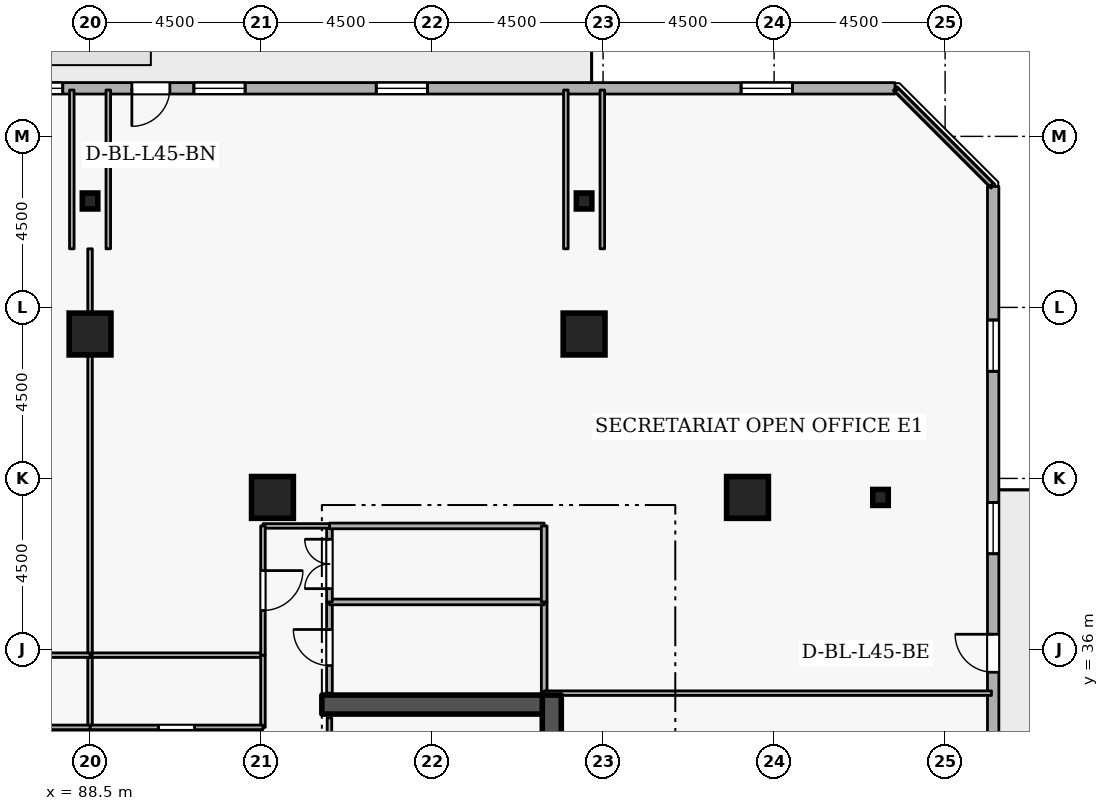
"""IFC4 building model, lengths in metres.
Left out: names, types, materials, properties, quantities, classifications, styles, units other than length and angle.
Written with IfcOpenShell. Run it as: python <this file> out.ifc"""

import sys

from ifc_helpers import new_model, si_unit, direction, frame, frame_2d, origin, origin_2d, place, context, subcontext, project, spatial, rectangle, i_section, extrude, element, fill, save


model = new_model("IFC4")
c1 = context("Model", 3, precision=1e-05, world=origin(), true_north=direction((0.0, 1.0)))
c2 = subcontext(c1, "Body", "Model", "MODEL_VIEW")
j1 = project(units=[si_unit("LENGTHUNIT", "METRE"), si_unit("PLANEANGLEUNIT", "RADIAN")], contexts=[c1])
p1 = place(None, origin())
s1 = spatial("IfcSite", under=j1, at=p1, CompositionType="ELEMENT")
p2 = place(p1, origin())
s2 = spatial("IfcBuilding", under=s1, at=p2, CompositionType="ELEMENT")
p3 = place(p2, frame((0.0, 0.0, 170.7)))
s3 = spatial("IfcBuildingStorey", under=s2, at=p3, CompositionType="ELEMENT", Elevation=170.7)
p4 = place(p3, frame((100.65, 19.2, 0.0), z_axis=(0.0, 0.0, 1.0), x_axis=(0.0, 1.0, 0.0)))
e1 = element("IfcWall", 1, at=p4, inside=s3, PredefinedType="SHEAR", context=c2, shape_type="SweptSolid", body=[
    extrude(rectangle(XDim=15.6, YDim=0.5, at=frame_2d((7.8, 0.0))), origin(), (0.0, 0.0, 1.0), 3.6),
])
p5 = place(p3, frame((94.6, 34.55, 0.0), z_axis=(0.0, 0.0, 1.0), x_axis=(1.0, 0.0, 0.0)))
e2 = element("IfcWall", 2, at=p5, inside=s3, PredefinedType="SHEAR", context=c2, shape_type="SweptSolid", body=[
    extrude(rectangle(XDim=5.8, YDim=0.5, at=frame_2d((2.9, 0.0))), origin(), (0.0, 0.0, 1.0), 3.6),
])
for number, where, z_axis, x_axis in (
    (3, (105.8, 40.0, 0.0), (0.0, 0.0, 1.0), (1.0, 0.0, 0.0)),
    (4, (101.5, 44.3, 0.0), (0.0, 0.0, 1.0), (1.0, 0.0, 0.0)),
    (5, (88.5, 44.3, 0.0), (0.0, 0.0, 1.0), (1.0, 0.0, 0.0)),
    (6, (93.3, 40.0, 0.0), (0.0, 0.0, 1.0), (1.0, 0.0, 0.0)),
):
    element("IfcColumn", number, at=place(p3, frame(where, z_axis=z_axis, x_axis=x_axis)), inside=s3, PredefinedType="COLUMN", context=c2, shape_type="SweptSolid", body=[
        extrude(rectangle(XDim=1.1, YDim=1.1, at=origin_2d()), origin(), (0.0, 0.0, 1.0), 3.6),
    ])
for number, where, z_axis, x_axis in (
    (7, (109.3, 40.0, 0.0), (0.0, 0.0, 1.0), (1.0, 0.0, 0.0)),
    (8, (101.5, 47.8, 0.0), (0.0, 0.0, 1.0), (1.0, 0.0, 0.0)),
    (9, (88.5, 47.8, 0.0), (0.0, 0.0, 1.0), (1.0, 0.0, 0.0)),
):
    element("IfcColumn", number, at=place(p3, frame(where, z_axis=z_axis, x_axis=x_axis)), inside=s3, PredefinedType="COLUMN", context=c2, shape_type="SweptSolid", body=[
        extrude(i_section(OverallWidth=0.407, OverallDepth=0.419, WebThickness=0.031, FlangeThickness=0.049, FilletRadius=0.015, at=origin_2d()), origin(), (0.0, 0.0, 1.0), 3.6),
    ])
p6 = place(p3, frame((112.265, 11.819, 0.0), z_axis=(0.0, 0.0, 1.0), x_axis=(0.0, 1.0, 0.0)))
e10 = element("IfcWall", 10, at=p6, inside=s3, PredefinedType="STANDARD", context=c2, shape_type="SweptSolid", body=[
    extrude(rectangle(XDim=36.363, YDim=0.3, at=frame_2d((18.181, 0.0))), origin(), (0.0, 0.0, 1.0), 2.22),
])
p7 = place(p6, frame((23.581, 0.0, 0.0)))
e11 = element("IfcOpeningElement", 11, at=p7, cuts=e10, PredefinedType="OPENING", context=c2, shape_type="SweptSolid", body=[
    extrude(rectangle(XDim=1.0, YDim=2.08, at=frame_2d((0.5, 1.04))), frame((0.0, 0.16, 0.0), z_axis=(0.0, -1.0, 0.0), x_axis=(1.0, 0.0, 0.0)), (0.0, 0.0, 1.0), 0.32),
])
p8 = place(p6, frame((2.7, 0.0, 0.72)))
e12 = element("IfcOpeningElement", 12, at=p8, cuts=e10, PredefinedType="OPENING", context=c2, shape_type="SweptSolid", body=[
    extrude(rectangle(XDim=1.35, YDim=1.05, at=frame_2d((0.675, 0.525))), frame((0.0, 0.16, 0.0), z_axis=(0.0, -1.0, 0.0), x_axis=(1.0, 0.0, 0.0)), (0.0, 0.0, 1.0), 0.32),
])
p9 = place(p6, frame((7.5, 0.0, 0.72)))
e13 = element("IfcOpeningElement", 13, at=p9, cuts=e10, PredefinedType="OPENING", context=c2, shape_type="SweptSolid", body=[
    extrude(rectangle(XDim=1.35, YDim=1.05, at=frame_2d((0.675, 0.525))), frame((0.0, 0.16, 0.0), z_axis=(0.0, -1.0, 0.0), x_axis=(1.0, 0.0, 0.0)), (0.0, 0.0, 1.0), 0.32),
])
p10 = place(p6, frame((12.3, 0.0, 0.72)))
e14 = element("IfcOpeningElement", 14, at=p10, cuts=e10, PredefinedType="OPENING", context=c2, shape_type="SweptSolid", body=[
    extrude(rectangle(XDim=1.35, YDim=1.05, at=frame_2d((0.675, 0.525))), frame((0.0, 0.16, 0.0), z_axis=(0.0, -1.0, 0.0), x_axis=(1.0, 0.0, 0.0)), (0.0, 0.0, 1.0), 0.32),
])
p11 = place(p6, frame((17.1, 0.0, 0.72)))
e15 = element("IfcOpeningElement", 15, at=p11, cuts=e10, PredefinedType="OPENING", context=c2, shape_type="SweptSolid", body=[
    extrude(rectangle(XDim=1.35, YDim=1.05, at=frame_2d((0.675, 0.525))), frame((0.0, 0.16, 0.0), z_axis=(0.0, -1.0, 0.0), x_axis=(1.0, 0.0, 0.0)), (0.0, 0.0, 1.0), 0.32),
])
p12 = place(p6, frame((26.7, 0.0, 0.72)))
e16 = element("IfcOpeningElement", 16, at=p12, cuts=e10, PredefinedType="OPENING", context=c2, shape_type="SweptSolid", body=[
    extrude(rectangle(XDim=1.35, YDim=1.05, at=frame_2d((0.675, 0.525))), frame((0.0, 0.16, 0.0), z_axis=(0.0, -1.0, 0.0), x_axis=(1.0, 0.0, 0.0)), (0.0, 0.0, 1.0), 0.32),
])
p13 = place(p6, frame((31.5, 0.0, 0.72)))
e17 = element("IfcOpeningElement", 17, at=p13, cuts=e10, PredefinedType="OPENING", context=c2, shape_type="SweptSolid", body=[
    extrude(rectangle(XDim=1.35, YDim=1.05, at=frame_2d((0.675, 0.525))), frame((0.0, 0.16, 0.0), z_axis=(0.0, -1.0, 0.0), x_axis=(1.0, 0.0, 0.0)), (0.0, 0.0, 1.0), 0.32),
])
p14 = place(p3, frame((109.681, 50.765, 0.0), z_axis=(0.0, 0.0, 1.0), x_axis=(-1.0, 0.0, 0.0)))
e18 = element("IfcWall", 18, at=p14, inside=s3, PredefinedType="STANDARD", context=c2, shape_type="SweptSolid", body=[
    extrude(rectangle(XDim=36.363, YDim=0.3, at=frame_2d((18.181, 0.0))), origin(), (0.0, 0.0, 1.0), 2.22),
])
p15 = place(p14, frame((19.081, 0.0, 0.0)))
e19 = element("IfcOpeningElement", 19, at=p15, cuts=e18, PredefinedType="OPENING", context=c2, shape_type="SweptSolid", body=[
    extrude(rectangle(XDim=1.0, YDim=2.08, at=frame_2d((0.5, 1.04))), frame((0.0, 0.16, 0.0), z_axis=(0.0, -1.0, 0.0), x_axis=(1.0, 0.0, 0.0)), (0.0, 0.0, 1.0), 0.32),
])
p16 = place(p14, frame((2.7, 0.0, 0.72)))
e20 = element("IfcOpeningElement", 20, at=p16, cuts=e18, PredefinedType="OPENING", context=c2, shape_type="SweptSolid", body=[
    extrude(rectangle(XDim=1.35, YDim=1.05, at=frame_2d((0.675, 0.525))), frame((0.0, 0.16, 0.0), z_axis=(0.0, -1.0, 0.0), x_axis=(1.0, 0.0, 0.0)), (0.0, 0.0, 1.0), 0.32),
])
p17 = place(p14, frame((12.3, 0.0, 0.72)))
e21 = element("IfcOpeningElement", 21, at=p17, cuts=e18, PredefinedType="OPENING", context=c2, shape_type="SweptSolid", body=[
    extrude(rectangle(XDim=1.35, YDim=1.05, at=frame_2d((0.675, 0.525))), frame((0.0, 0.16, 0.0), z_axis=(0.0, -1.0, 0.0), x_axis=(1.0, 0.0, 0.0)), (0.0, 0.0, 1.0), 0.32),
])
p18 = place(p14, frame((17.1, 0.0, 0.72)))
e22 = element("IfcOpeningElement", 22, at=p18, cuts=e18, PredefinedType="OPENING", context=c2, shape_type="SweptSolid", body=[
    extrude(rectangle(XDim=1.35, YDim=1.05, at=frame_2d((0.675, 0.525))), frame((0.0, 0.16, 0.0), z_axis=(0.0, -1.0, 0.0), x_axis=(1.0, 0.0, 0.0)), (0.0, 0.0, 1.0), 0.32),
])
p19 = place(p14, frame((21.9, 0.0, 0.72)))
e23 = element("IfcOpeningElement", 23, at=p19, cuts=e18, PredefinedType="OPENING", context=c2, shape_type="SweptSolid", body=[
    extrude(rectangle(XDim=1.35, YDim=1.05, at=frame_2d((0.675, 0.525))), frame((0.0, 0.16, 0.0), z_axis=(0.0, -1.0, 0.0), x_axis=(1.0, 0.0, 0.0)), (0.0, 0.0, 1.0), 0.32),
])
p20 = place(p14, frame((26.7, 0.0, 0.72)))
e24 = element("IfcOpeningElement", 24, at=p20, cuts=e18, PredefinedType="OPENING", context=c2, shape_type="SweptSolid", body=[
    extrude(rectangle(XDim=1.35, YDim=1.05, at=frame_2d((0.675, 0.525))), frame((0.0, 0.16, 0.0), z_axis=(0.0, -1.0, 0.0), x_axis=(1.0, 0.0, 0.0)), (0.0, 0.0, 1.0), 0.32),
])
p21 = place(p14, frame((31.5, 0.0, 0.72)))
e25 = element("IfcOpeningElement", 25, at=p21, cuts=e18, PredefinedType="OPENING", context=c2, shape_type="SweptSolid", body=[
    extrude(rectangle(XDim=1.35, YDim=1.05, at=frame_2d((0.675, 0.525))), frame((0.0, 0.16, 0.0), z_axis=(0.0, -1.0, 0.0), x_axis=(1.0, 0.0, 0.0)), (0.0, 0.0, 1.0), 0.32),
])
p22 = place(p3, frame((94.8, 32.1, 0.0), z_axis=(0.0, 0.0, 1.0), x_axis=(0.0, 1.0, 0.0)))
e26 = element("IfcWall", 26, at=p22, inside=s3, PredefinedType="PARTITIONING", context=c2, shape_type="SweptSolid", body=[
    extrude(rectangle(XDim=2.1, YDim=0.12, at=frame_2d((1.05, 0.0))), origin(), (0.0, 0.0, 1.0), 3.26),
])
p23 = place(p22, frame((0.575, 0.0, 0.0)))
e27 = element("IfcOpeningElement", 27, at=p23, cuts=e26, PredefinedType="OPENING", context=c2, shape_type="SweptSolid", body=[
    extrude(rectangle(XDim=0.95, YDim=2.1, at=frame_2d((0.475, 1.05))), frame((0.0, 0.07, 0.0), z_axis=(0.0, -1.0, 0.0), x_axis=(1.0, 0.0, 0.0)), (0.0, 0.0, 1.0), 0.14),
])
p24 = place(p3, frame((100.45, 37.25, 0.0), z_axis=(0.0, 0.0, 1.0), x_axis=(0.0, -1.0, 0.0)))
e28 = element("IfcWall", 28, at=p24, inside=s3, PredefinedType="PARTITIONING", context=c2, shape_type="SweptSolid", body=[
    extrude(rectangle(XDim=2.4, YDim=0.15, at=frame_2d((1.2, 0.0))), origin(), (0.0, 0.0, 1.0), 3.26),
])
p25 = place(p3, frame((94.8, 34.85, 0.0), z_axis=(0.0, 0.0, 1.0), x_axis=(0.0, 1.0, 0.0)))
e29 = element("IfcWall", 29, at=p25, inside=s3, PredefinedType="PARTITIONING", context=c2, shape_type="SweptSolid", body=[
    extrude(rectangle(XDim=2.4, YDim=0.15, at=frame_2d((1.2, 0.0))), origin(), (0.0, 0.0, 1.0), 3.26),
])
p26 = place(p25, frame((0.725, 0.0, 0.0)))
e30 = element("IfcOpeningElement", 30, at=p26, cuts=e29, PredefinedType="OPENING", context=c2, shape_type="SweptSolid", body=[
    extrude(rectangle(XDim=0.95, YDim=2.1, at=frame_2d((0.475, 1.05))), frame((0.0, 0.085, 0.0), z_axis=(0.0, -1.0, 0.0), x_axis=(1.0, 0.0, 0.0)), (0.0, 0.0, 1.0), 0.17),
])
p27 = place(p3, frame((94.8, 37.25, 0.0), z_axis=(0.0, 0.0, 1.0), x_axis=(1.0, 0.0, 0.0)))
e31 = element("IfcWall", 31, at=p27, inside=s3, PredefinedType="PARTITIONING", context=c2, shape_type="SweptSolid", body=[
    extrude(rectangle(XDim=5.65, YDim=0.15, at=frame_2d((2.825, 0.0))), origin(), (0.0, 0.0, 1.0), 3.26),
])
p28 = place(p3, frame((94.8, 37.25, 0.0), z_axis=(0.0, 0.0, 1.0), x_axis=(0.0, 1.0, 0.0)))
e32 = element("IfcWall", 32, at=p28, inside=s3, PredefinedType="PARTITIONING", context=c2, shape_type="SweptSolid", body=[
    extrude(rectangle(XDim=2.0, YDim=0.15, at=frame_2d((1.0, 0.0))), origin(), (0.0, 0.0, 1.0), 3.26),
])
p29 = place(p28, frame((0.35, 0.0, 0.0)))
e33 = element("IfcOpeningElement", 33, at=p29, cuts=e32, PredefinedType="OPENING", context=c2, shape_type="SweptSolid", body=[
    extrude(rectangle(XDim=1.3, YDim=2.12, at=frame_2d((0.65, 1.06))), frame((0.0, 0.085, 0.0), z_axis=(0.0, -1.0, 0.0), x_axis=(1.0, 0.0, 0.0)), (0.0, 0.0, 1.0), 0.17),
])
p30 = place(p3, frame((94.8, 39.25, 0.0), z_axis=(0.0, 0.0, 1.0), x_axis=(1.0, 0.0, 0.0)))
e34 = element("IfcWall", 34, at=p30, inside=s3, PredefinedType="PARTITIONING", context=c2, shape_type="SweptSolid", body=[
    extrude(rectangle(XDim=5.65, YDim=0.15, at=frame_2d((2.825, 0.0))), origin(), (0.0, 0.0, 1.0), 3.26),
])
p31 = place(p3, frame((100.45, 39.25, 0.0), z_axis=(0.0, 0.0, 1.0), x_axis=(0.0, -1.0, 0.0)))
e35 = element("IfcWall", 35, at=p31, inside=s3, PredefinedType="PARTITIONING", context=c2, shape_type="SweptSolid", body=[
    extrude(rectangle(XDim=2.0, YDim=0.15, at=frame_2d((1.0, 0.0))), origin(), (0.0, 0.0, 1.0), 3.26),
])
p32 = place(p3, frame((88.5, 33.95, 0.0), z_axis=(0.0, 0.0, 1.0), x_axis=(0.0, 1.0, 0.0)))
e36 = element("IfcWall", 36, at=p32, inside=s3, PredefinedType="PARTITIONING", context=c2, shape_type="SweptSolid", body=[
    extrude(rectangle(XDim=1.9, YDim=0.12, at=frame_2d((0.95, 0.0))), origin(), (0.0, 0.0, 1.0), 1.785),
])
p33 = place(p3, frame((88.5, 35.85, 0.0), z_axis=(0.0, 0.0, 1.0), x_axis=(1.0, 0.0, 0.0)))
e37 = element("IfcWall", 37, at=p33, inside=s3, PredefinedType="PARTITIONING", context=c2, shape_type="SweptSolid", body=[
    extrude(rectangle(XDim=4.55, YDim=0.12, at=frame_2d((2.275, 0.0))), origin(), (0.0, 0.0, 1.0), 3.26),
])
p34 = place(p3, frame((93.05, 35.85, 0.0), z_axis=(0.0, 0.0, 1.0), x_axis=(0.0, -1.0, 0.0)))
e38 = element("IfcWall", 38, at=p34, inside=s3, PredefinedType="PARTITIONING", context=c2, shape_type="SweptSolid", body=[
    extrude(rectangle(XDim=1.9, YDim=0.12, at=frame_2d((0.95, 0.0))), origin(), (0.0, 0.0, 1.0), 3.26),
])
p35 = place(p3, frame((93.05, 33.95, 0.0), z_axis=(0.0, 0.0, 1.0), x_axis=(-1.0, 0.0, 0.0)))
e39 = element("IfcWall", 39, at=p35, inside=s3, PredefinedType="PARTITIONING", context=c2, shape_type="SweptSolid", body=[
    extrude(rectangle(XDim=4.55, YDim=0.12, at=frame_2d((2.275, 0.0))), origin(), (0.0, 0.0, 1.0), 3.26),
])
p36 = place(p35, frame((1.8, 0.0, 0.0)))
e40 = element("IfcOpeningElement", 40, at=p36, cuts=e39, PredefinedType="OPENING", context=c2, shape_type="SweptSolid", body=[
    extrude(rectangle(XDim=0.95, YDim=2.1, at=frame_2d((0.475, 1.05))), frame((0.0, 0.07, 0.0), z_axis=(0.0, -1.0, 0.0), x_axis=(1.0, 0.0, 0.0)), (0.0, 0.0, 1.0), 0.14),
])
p37 = place(p3, frame((94.8, 39.25, 0.0), z_axis=(0.0, 0.0, 1.0), x_axis=(-1.0, 0.0, 0.0)))
e41 = element("IfcWall", 41, at=p37, inside=s3, PredefinedType="PARTITIONING", context=c2, shape_type="SweptSolid", body=[
    extrude(rectangle(XDim=1.75, YDim=0.12, at=frame_2d((0.875, 0.0))), origin(), (0.0, 0.0, 1.0), 3.26),
])
p38 = place(p3, frame((93.05, 39.25, 0.0), z_axis=(0.0, 0.0, 1.0), x_axis=(0.0, -1.0, 0.0)))
e42 = element("IfcWall", 42, at=p38, inside=s3, PredefinedType="PARTITIONING", context=c2, shape_type="SweptSolid", body=[
    extrude(rectangle(XDim=3.4, YDim=0.12, at=frame_2d((1.7, 0.0))), origin(), (0.0, 0.0, 1.0), 3.26),
])
p39 = place(p38, frame((1.175, 0.0, 0.0)))
e43 = element("IfcOpeningElement", 43, at=p39, cuts=e42, PredefinedType="OPENING", context=c2, shape_type="SweptSolid", body=[
    extrude(rectangle(XDim=1.05, YDim=2.1, at=frame_2d((0.525, 1.05))), frame((0.0, 0.07, 0.0), z_axis=(0.0, -1.0, 0.0), x_axis=(1.0, 0.0, 0.0)), (0.0, 0.0, 1.0), 0.14),
])
p40 = place(p3, frame((88.5, 35.85, 0.0), z_axis=(0.0, 0.0, 1.0), x_axis=(0.0, 1.0, 0.0)))
e44 = element("IfcWall", 44, at=p40, inside=s3, PredefinedType="PARTITIONING", context=c2, shape_type="SweptSolid", body=[
    extrude(rectangle(XDim=10.692, YDim=0.12, at=frame_2d((5.346, 0.0))), origin(), (0.0, 0.0, 1.0), 1.785),
])
for number, where, z_axis, x_axis in (
    (45, (88.98, 46.542, 0.0), (0.0, 0.0, 1.0), (0.0, 1.0, 0.0)),
    (46, (101.02, 50.72, 0.0), (0.0, 0.0, 1.0), (0.0, -1.0, 0.0)),
    (47, (101.98, 46.542, 0.0), (0.0, 0.0, 1.0), (0.0, 1.0, 0.0)),
):
    element("IfcWall", number, at=place(p3, frame(where, z_axis=z_axis, x_axis=x_axis)), inside=s3, PredefinedType="PARTITIONING", context=c2, shape_type="SweptSolid", body=[
        extrude(rectangle(XDim=4.178, YDim=0.12, at=frame_2d((2.089, 0.0))), origin(), (0.0, 0.0, 1.0), 1.785),
    ])
p41 = place(p3, frame((109.725, 50.72, 0.0), z_axis=(0.0, 0.0, 1.0), x_axis=(0.707106781187, -0.707106781187, 0.0)))
e48 = element("IfcWall", 48, at=p41, inside=s3, PredefinedType="PARTITIONING", context=c2, shape_type="SweptSolid", body=[
    extrude(rectangle(XDim=3.528, YDim=0.12, at=frame_2d((1.764, 0.0))), origin(), (0.0, 0.0, 1.0), 3.26),
])
p42 = place(p3, frame((112.22, 34.85, 0.0), z_axis=(0.0, 0.0, 1.0), x_axis=(-1.0, 0.0, 0.0)))
e49 = element("IfcWall", 49, at=p42, inside=s3, PredefinedType="PARTITIONING", context=c2, shape_type="SweptSolid", body=[
    extrude(rectangle(XDim=11.77, YDim=0.12, at=frame_2d((5.885, 0.0))), origin(), (0.0, 0.0, 1.0), 2.465),
])
p43 = place(p3, frame((83.95, 35.85, 0.0), z_axis=(0.0, 0.0, 1.0), x_axis=(1.0, 0.0, 0.0)))
e50 = element("IfcWall", 50, at=p43, inside=s3, PredefinedType="PARTITIONING", context=c2, shape_type="SweptSolid", body=[
    extrude(rectangle(XDim=4.55, YDim=0.12, at=frame_2d((2.275, 0.0))), origin(), (0.0, 0.0, 1.0), 3.26),
])
p44 = place(p3, frame((88.5, 33.95, 0.0), z_axis=(0.0, 0.0, 1.0), x_axis=(-1.0, 0.0, 0.0)))
e51 = element("IfcWall", 51, at=p44, inside=s3, PredefinedType="PARTITIONING", context=c2, shape_type="SweptSolid", body=[
    extrude(rectangle(XDim=4.55, YDim=0.12, at=frame_2d((2.275, 0.0))), origin(), (0.0, 0.0, 1.0), 3.26),
])
p45 = place(p44, frame((1.8, 0.0, 0.0)))
e52 = element("IfcOpeningElement", 52, at=p45, cuts=e51, PredefinedType="OPENING", context=c2, shape_type="SweptSolid", body=[
    extrude(rectangle(XDim=0.95, YDim=2.1, at=frame_2d((0.475, 1.05))), frame((0.0, 0.07, 0.0), z_axis=(0.0, -1.0, 0.0), x_axis=(1.0, 0.0, 0.0)), (0.0, 0.0, 1.0), 0.14),
])
p46 = place(p3, frame((88.02, 50.72, 0.0), z_axis=(0.0, 0.0, 1.0), x_axis=(0.0, -1.0, 0.0)))
e53 = element("IfcWall", 53, at=p46, inside=s3, PredefinedType="PARTITIONING", context=c2, shape_type="SweptSolid", body=[
    extrude(rectangle(XDim=4.178, YDim=0.12, at=frame_2d((2.089, 0.0))), origin(), (0.0, 0.0, 1.0), 1.785),
])
p47 = place(p7, origin())
e54 = element("IfcDoor", 54, at=p47, inside=s3, OperationType="SINGLE_SWING_RIGHT", PredefinedType="DOOR", context=c2, shape_type="SweptSolid", body=[
    extrude(rectangle(XDim=1.0, YDim=2.08, at=frame_2d((0.5, 1.04))), frame((0.0, 0.025, 0.0), z_axis=(0.0, -1.0, 0.0), x_axis=(1.0, 0.0, 0.0)), (0.0, 0.0, 1.0), 0.05),
])
fill(e11, e54)
p48 = place(p12, origin())
e55 = element("IfcWindow", 55, at=p48, inside=s3, PartitioningType="SINGLE_PANEL", PredefinedType="WINDOW", context=c2, shape_type="SweptSolid", body=[
    extrude(rectangle(XDim=1.35, YDim=1.05, at=frame_2d((0.675, 0.525))), frame((0.0, 0.03, 0.0), z_axis=(0.0, -1.0, 0.0), x_axis=(1.0, 0.0, 0.0)), (0.0, 0.0, 1.0), 0.06),
])
fill(e16, e55)
p49 = place(p13, origin())
e56 = element("IfcWindow", 56, at=p49, inside=s3, PartitioningType="SINGLE_PANEL", PredefinedType="WINDOW", context=c2, shape_type="SweptSolid", body=[
    extrude(rectangle(XDim=1.35, YDim=1.05, at=frame_2d((0.675, 0.525))), frame((0.0, 0.03, 0.0), z_axis=(0.0, -1.0, 0.0), x_axis=(1.0, 0.0, 0.0)), (0.0, 0.0, 1.0), 0.06),
])
fill(e17, e56)
p50 = place(p15, origin())
e57 = element("IfcDoor", 57, at=p50, inside=s3, OperationType="SINGLE_SWING_RIGHT", PredefinedType="DOOR", context=c2, shape_type="SweptSolid", body=[
    extrude(rectangle(XDim=1.0, YDim=2.08, at=frame_2d((0.5, 1.04))), frame((0.0, 0.025, 0.0), z_axis=(0.0, -1.0, 0.0), x_axis=(1.0, 0.0, 0.0)), (0.0, 0.0, 1.0), 0.05),
])
fill(e19, e57)
p51 = place(p16, origin())
e58 = element("IfcWindow", 58, at=p51, inside=s3, PartitioningType="SINGLE_PANEL", PredefinedType="WINDOW", context=c2, shape_type="SweptSolid", body=[
    extrude(rectangle(XDim=1.35, YDim=1.05, at=frame_2d((0.675, 0.525))), frame((0.0, 0.03, 0.0), z_axis=(0.0, -1.0, 0.0), x_axis=(1.0, 0.0, 0.0)), (0.0, 0.0, 1.0), 0.06),
])
fill(e20, e58)
p52 = place(p17, origin())
e59 = element("IfcWindow", 59, at=p52, inside=s3, PartitioningType="SINGLE_PANEL", PredefinedType="WINDOW", context=c2, shape_type="SweptSolid", body=[
    extrude(rectangle(XDim=1.35, YDim=1.05, at=frame_2d((0.675, 0.525))), frame((0.0, 0.03, 0.0), z_axis=(0.0, -1.0, 0.0), x_axis=(1.0, 0.0, 0.0)), (0.0, 0.0, 1.0), 0.06),
])
fill(e21, e59)
p53 = place(p18, origin())
e60 = element("IfcWindow", 60, at=p53, inside=s3, PartitioningType="SINGLE_PANEL", PredefinedType="WINDOW", context=c2, shape_type="SweptSolid", body=[
    extrude(rectangle(XDim=1.35, YDim=1.05, at=frame_2d((0.675, 0.525))), frame((0.0, 0.03, 0.0), z_axis=(0.0, -1.0, 0.0), x_axis=(1.0, 0.0, 0.0)), (0.0, 0.0, 1.0), 0.06),
])
fill(e22, e60)
p54 = place(p19, origin())
e61 = element("IfcWindow", 61, at=p54, inside=s3, PartitioningType="SINGLE_PANEL", PredefinedType="WINDOW", context=c2, shape_type="SweptSolid", body=[
    extrude(rectangle(XDim=1.35, YDim=1.05, at=frame_2d((0.675, 0.525))), frame((0.0, 0.03, 0.0), z_axis=(0.0, -1.0, 0.0), x_axis=(1.0, 0.0, 0.0)), (0.0, 0.0, 1.0), 0.06),
])
fill(e23, e61)
p55 = place(p26, origin())
e62 = element("IfcDoor", 62, at=p55, inside=s3, OperationType="SINGLE_SWING_RIGHT", PredefinedType="DOOR", context=c2, shape_type="SweptSolid", body=[
    extrude(rectangle(XDim=0.95, YDim=2.1, at=frame_2d((0.475, 1.05))), frame((0.0, 0.025, 0.0), z_axis=(0.0, -1.0, 0.0), x_axis=(1.0, 0.0, 0.0)), (0.0, 0.0, 1.0), 0.05),
])
fill(e30, e62)
p56 = place(p29, origin())
e63 = element("IfcDoor", 63, at=p56, inside=s3, OperationType="DOUBLE_DOOR_SINGLE_SWING", PredefinedType="DOOR", context=c2, shape_type="SweptSolid", body=[
    extrude(rectangle(XDim=1.3, YDim=2.12, at=frame_2d((0.65, 1.06))), frame((0.0, 0.025, 0.0), z_axis=(0.0, -1.0, 0.0), x_axis=(1.0, 0.0, 0.0)), (0.0, 0.0, 1.0), 0.05),
])
fill(e33, e63)
p57 = place(p36, origin())
e64 = element("IfcDoor", 64, at=p57, inside=s3, OperationType="SINGLE_SWING_RIGHT", PredefinedType="DOOR", context=c2, shape_type="SweptSolid", body=[
    extrude(rectangle(XDim=0.95, YDim=2.1, at=frame_2d((0.475, 1.05))), frame((0.0, 0.025, 0.0), z_axis=(0.0, -1.0, 0.0), x_axis=(1.0, 0.0, 0.0)), (0.0, 0.0, 1.0), 0.05),
])
fill(e40, e64)
p58 = place(p39, origin())
e65 = element("IfcDoor", 65, at=p58, inside=s3, OperationType="SINGLE_SWING_LEFT", PredefinedType="DOOR", context=c2, shape_type="SweptSolid", body=[
    extrude(rectangle(XDim=1.05, YDim=2.1, at=frame_2d((0.525, 1.05))), frame((0.0, 0.025, 0.0), z_axis=(0.0, -1.0, 0.0), x_axis=(1.0, 0.0, 0.0)), (0.0, 0.0, 1.0), 0.05),
])
fill(e43, e65)
save(model, sys.argv[1])
